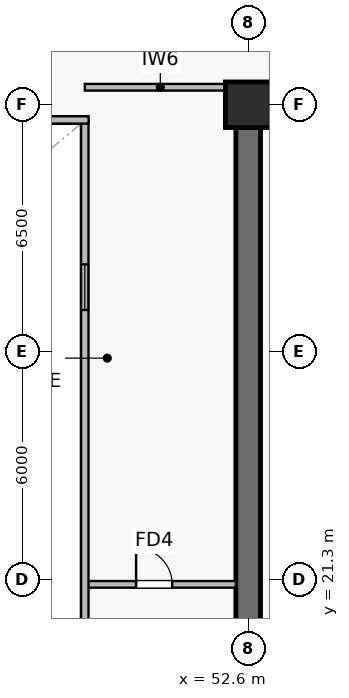
"""IFC4 building model, lengths in metres.
Left out: names, types, materials, properties, quantities, classifications, styles, units other than length and angle.
Written with IfcOpenShell. Run it as: python <this file> out.ifc"""

import sys

from ifc_helpers import new_model, si_unit, direction, frame, frame_2d, origin, origin_2d, place, context, subcontext, project, spatial, rectangle, extrude, source, transform, mapped, element, fill, save


model = new_model("IFC4")
c1 = context("Model", 3, precision=1e-05, world=origin(), true_north=direction((0.0, 1.0)))
c2 = subcontext(c1, "Body", "Model", "MODEL_VIEW")
j1 = project(units=[si_unit("LENGTHUNIT", "METRE"), si_unit("PLANEANGLEUNIT", "RADIAN")], contexts=[c1])
p1 = place(None, origin())
s1 = spatial("IfcSite", under=j1, at=p1, CompositionType="ELEMENT")
p2 = place(p1, origin())
s2 = spatial("IfcBuilding", under=s1, at=p2, CompositionType="ELEMENT")
p3 = place(p2, frame((0.0, 0.0, 129.7)))
s3 = spatial("IfcBuildingStorey", under=s2, at=p3, CompositionType="ELEMENT", Elevation=129.7)
p4 = place(p3, frame((52.275, 33.8, 0.0), z_axis=(0.0, 0.0, 1.0), x_axis=(1.0, 0.0, 0.0)))
e1 = element("IfcWall", 1, at=p4, inside=s3, PredefinedType="SHEAR", context=c2, shape_type="SweptSolid", body=[
    extrude(rectangle(XDim=15.45, YDim=0.65, at=frame_2d((7.725, 0.0))), origin(), (0.0, 0.0, 1.0), 3.79),
])
p5 = place(p4, frame((7.675, 0.0, 0.0)))
e2 = element("IfcOpeningElement", 2, at=p5, cuts=e1, PredefinedType="OPENING", context=c2, shape_type="SweptSolid", body=[
    extrude(rectangle(XDim=0.95, YDim=2.15, at=frame_2d((0.475, 1.075))), frame((0.0, 0.335, 0.0), z_axis=(0.0, -1.0, 0.0), x_axis=(1.0, 0.0, 0.0)), (0.0, 0.0, 1.0), 0.67),
])
p6 = place(p4, frame((2.61, 0.0, 0.0)))
e3 = element("IfcOpeningElement", 3, at=p6, cuts=e1, PredefinedType="OPENING", context=c2, shape_type="SweptSolid", body=[
    extrude(rectangle(XDim=0.95, YDim=2.15, at=frame_2d((0.475, 1.075))), frame((0.0, 0.335, 0.0), z_axis=(0.0, -1.0, 0.0), x_axis=(1.0, 0.0, 0.0)), (0.0, 0.0, 1.0), 0.67),
])
p7 = place(p3, frame((52.6, 15.125, 0.0), z_axis=(0.0, 0.0, 1.0), x_axis=(0.0, 1.0, 0.0)))
e4 = element("IfcWall", 4, at=p7, inside=s3, PredefinedType="SHEAR", context=c2, shape_type="SweptSolid", body=[
    extrude(rectangle(XDim=18.35, YDim=0.65, at=frame_2d((9.175, 0.0))), origin(), (0.0, 0.0, 1.0), 3.79),
])
p8 = place(p7, frame((3.425, 0.0, 0.0)))
e5 = element("IfcOpeningElement", 5, at=p8, cuts=e4, PredefinedType="OPENING", context=c2, shape_type="SweptSolid", body=[
    extrude(rectangle(XDim=1.42, YDim=2.2, at=frame_2d((0.71, 1.1))), frame((0.0, 0.335, 0.0), z_axis=(0.0, -1.0, 0.0), x_axis=(1.0, 0.0, 0.0)), (0.0, 0.0, 1.0), 0.67),
])
m1 = source(origin(), c2, "Body", "SweptSolid", [
    extrude(rectangle(XDim=1.2, YDim=1.2, at=origin_2d()), origin(), (0.0, 0.0, 1.0), 4.1),
])
p9 = place(p3, frame((52.6, 33.8, 0.0), z_axis=(0.0, 0.0, 1.0), x_axis=(1.0, 0.0, 0.0)))
e6 = element("IfcColumn", 6, at=p9, inside=s3, PredefinedType="COLUMN", context=c2, shape_type="MappedRepresentation", body=[
    mapped(m1, transform((0.0, 0.0, 0.0), scale=1.0)),
])
p10 = place(p3, frame((48.3, 34.26, 0.0), z_axis=(0.0, 0.0, 1.0), x_axis=(1.0, 0.0, 0.0)))
e7 = element("IfcWall", 7, at=p10, inside=s3, PredefinedType="PARTITIONING", context=c2, shape_type="SweptSolid", body=[
    extrude(rectangle(XDim=3.975, YDim=0.175, at=frame_2d((1.987, 0.0))), origin(), (0.0, 0.0, 1.0), 3.475),
])
p11 = place(p3, frame((48.3, 21.18, 0.0), z_axis=(0.0, 0.0, 1.0), x_axis=(1.0, 0.0, 0.0)))
e8 = element("IfcWall", 8, at=p11, inside=s3, PredefinedType="PARTITIONING", context=c2, shape_type="SweptSolid", body=[
    extrude(rectangle(XDim=3.975, YDim=0.175, at=frame_2d((1.987, 0.0))), origin(), (0.0, 0.0, 1.0), 3.79),
])
p12 = place(p11, frame((1.35, 0.0, 0.0)))
e9 = element("IfcOpeningElement", 9, at=p12, cuts=e8, PredefinedType="OPENING", context=c2, shape_type="SweptSolid", body=[
    extrude(rectangle(XDim=0.95, YDim=2.15, at=frame_2d((0.475, 1.075))), frame((0.0, 0.098, 0.0), z_axis=(0.0, -1.0, 0.0), x_axis=(1.0, 0.0, 0.0)), (0.0, 0.0, 1.0), 0.195),
])
p13 = place(p3, frame((48.3, 15.2, 0.0), z_axis=(0.0, 0.0, 1.0), x_axis=(0.0, 1.0, 0.0)))
e10 = element("IfcWall", 10, at=p13, inside=s3, PredefinedType="SOLIDWALL", context=c2, shape_type="SweptSolid", body=[
    extrude(rectangle(XDim=18.2, YDim=0.195, at=frame_2d((9.1, 0.0))), origin(), (0.0, 0.0, 1.0), 3.79),
])
p14 = place(p13, frame((1.8, 0.0, 0.9)))
e11 = element("IfcOpeningElement", 11, at=p14, cuts=e10, PredefinedType="OPENING", context=c2, shape_type="SweptSolid", body=[
    extrude(rectangle(XDim=1.2, YDim=1.35, at=frame_2d((0.6, 0.675))), frame((0.0, 0.107, 0.0), z_axis=(0.0, -1.0, 0.0), x_axis=(1.0, 0.0, 0.0)), (0.0, 0.0, 1.0), 0.215),
])
p15 = place(p13, frame((13.2, 0.0, 0.9)))
e12 = element("IfcOpeningElement", 12, at=p15, cuts=e10, PredefinedType="OPENING", context=c2, shape_type="SweptSolid", body=[
    extrude(rectangle(XDim=1.2, YDim=1.35, at=frame_2d((0.6, 0.675))), frame((0.0, 0.107, 0.0), z_axis=(0.0, -1.0, 0.0), x_axis=(1.0, 0.0, 0.0)), (0.0, 0.0, 1.0), 0.215),
])
p16 = place(p3, frame((26.4, 33.4, 0.0), z_axis=(0.0, 0.0, 1.0), x_axis=(1.0, 0.0, 0.0)))
e13 = element("IfcWall", 13, at=p16, inside=s3, PredefinedType="SOLIDWALL", context=c2, shape_type="SweptSolid", body=[
    extrude(rectangle(XDim=22.0, YDim=0.195, at=frame_2d((11.0, 0.0))), origin(), (0.0, 0.0, 1.0), 3.79),
])
m2 = source(origin(), c2, "Body", "SweptSolid", [
    extrude(rectangle(XDim=1.2, YDim=1.35, at=frame_2d((0.6, 0.675))), frame((0.0, 0.03, 0.0), z_axis=(0.0, -1.0, 0.0), x_axis=(1.0, 0.0, 0.0)), (0.0, 0.0, 1.0), 0.06),
])
p17 = place(p15, origin())
e14 = element("IfcWindow", 14, at=p17, inside=s3, PartitioningType="SINGLE_PANEL", PredefinedType="WINDOW", context=c2, shape_type="MappedRepresentation", body=[
    mapped(m2, transform((0.0, 0.0, 0.0), scale=1.0)),
])
fill(e12, e14)
m3 = source(origin(), c2, "Body", "SweptSolid", [
    extrude(rectangle(XDim=0.95, YDim=2.15, at=frame_2d((0.475, 1.075))), frame((0.0, 0.025, 0.0), z_axis=(0.0, -1.0, 0.0), x_axis=(1.0, 0.0, 0.0)), (0.0, 0.0, 1.0), 0.05),
])
p18 = place(p12, origin())
e15 = element("IfcDoor", 15, at=p18, inside=s3, OperationType="SINGLE_SWING_LEFT", PredefinedType="DOOR", context=c2, shape_type="MappedRepresentation", body=[
    mapped(m3, transform((0.0, 0.0, 0.0), scale=1.0)),
])
fill(e9, e15)
save(model, sys.argv[1])
